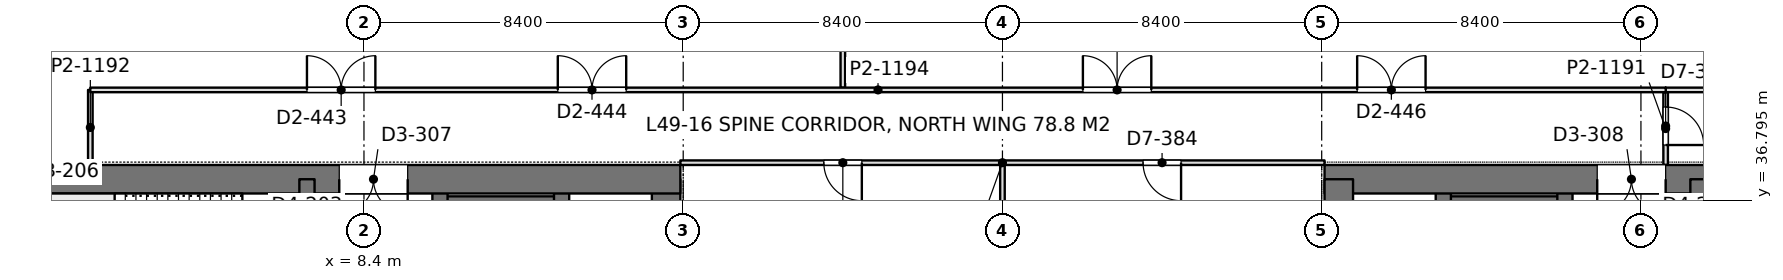
"""IFC4 building model, lengths in metres.
Left out: names, types, materials, properties, quantities, classifications, styles, units other than length and angle.
Written with IfcOpenShell. Run it as: python <this file> out.ifc"""

import sys

from ifc_helpers import new_model, si_unit, direction, frame, frame_2d, origin, place, context, subcontext, project, spatial, rectangle, extrude, element, fill, save


model = new_model("IFC4")
c1 = context("Model", 3, precision=1e-05, world=origin(), true_north=direction((0.0, 1.0)))
c2 = subcontext(c1, "Body", "Model", "MODEL_VIEW")
j1 = project(units=[si_unit("LENGTHUNIT", "METRE"), si_unit("PLANEANGLEUNIT", "RADIAN")], contexts=[c1])
p1 = place(None, origin())
s1 = spatial("IfcSite", under=j1, at=p1, CompositionType="ELEMENT")
p2 = place(p1, origin())
s2 = spatial("IfcBuilding", under=s1, at=p2, CompositionType="ELEMENT")
p3 = place(p2, frame((0.0, 0.0, 215.4)))
s3 = spatial("IfcBuildingStorey", under=s2, at=p3, CompositionType="ELEMENT", Elevation=215.4)
p4 = place(p3, frame((-1.125, 37.35, 0.0), z_axis=(0.0, 0.0, 1.0), x_axis=(1.0, 0.0, 0.0)))
e1 = element("IfcWall", 1, at=p4, inside=s3, PredefinedType="SHEAR", context=c2, shape_type="SweptSolid", body=[
    extrude(rectangle(XDim=17.85, YDim=0.75, at=frame_2d((8.925, 0.0))), origin(), (0.0, 0.0, 1.0), 4.2),
])
p5 = place(p4, frame((8.875, 0.0, 0.0)))
e2 = element("IfcOpeningElement", 2, at=p5, cuts=e1, PredefinedType="OPENING", context=c2, shape_type="SweptSolid", body=[
    extrude(rectangle(XDim=1.8, YDim=2.4, at=frame_2d((0.9, 1.2))), frame((0.0, 0.385, 0.0), z_axis=(0.0, -1.0, 0.0), x_axis=(1.0, 0.0, 0.0)), (0.0, 0.0, 1.0), 0.77),
])
p6 = place(p3, frame((16.35, 27.8, 0.0), z_axis=(0.0, 0.0, 1.0), x_axis=(0.0, 1.0, 0.0)))
e3 = element("IfcWall", 3, at=p6, inside=s3, PredefinedType="SHEAR", context=c2, shape_type="SweptSolid", body=[
    extrude(rectangle(XDim=9.55, YDim=0.75, at=frame_2d((4.775, 0.0))), origin(), (0.0, 0.0, 1.0), 4.2),
])
p7 = place(p3, frame((6.9, 13.05, 0.0), z_axis=(0.0, 0.0, 1.0), x_axis=(0.0, 1.0, 0.0)))
e4 = element("IfcWall", 4, at=p7, inside=s3, PredefinedType="SHEAR", context=c2, shape_type="SweptSolid", body=[
    extrude(rectangle(XDim=24.3, YDim=0.4, at=frame_2d((12.15, 0.0))), origin(), (0.0, 0.0, 1.0), 4.2),
])
p8 = place(p7, frame((1.3, 0.0, 0.0)))
e5 = element("IfcOpeningElement", 5, at=p8, cuts=e4, PredefinedType="OPENING", context=c2, shape_type="SweptSolid", body=[
    extrude(rectangle(XDim=1.0, YDim=2.2, at=frame_2d((0.5, 1.1))), frame((0.0, 0.21, 0.0), z_axis=(0.0, -1.0, 0.0), x_axis=(1.0, 0.0, 0.0)), (0.0, 0.0, 1.0), 0.42),
])
p9 = place(p7, frame((22.0, 0.0, 0.0)))
e6 = element("IfcOpeningElement", 6, at=p9, cuts=e4, PredefinedType="OPENING", context=c2, shape_type="SweptSolid", body=[
    extrude(rectangle(XDim=1.0, YDim=2.2, at=frame_2d((0.5, 1.1))), frame((0.0, 0.21, 0.0), z_axis=(0.0, -1.0, 0.0), x_axis=(1.0, 0.0, 0.0)), (0.0, 0.0, 1.0), 0.42),
])
p10 = place(p7, frame((5.55, 0.0, 0.0)))
e7 = element("IfcOpeningElement", 7, at=p10, cuts=e4, PredefinedType="OPENING", context=c2, shape_type="SweptSolid", body=[
    extrude(rectangle(XDim=1.0, YDim=2.2, at=frame_2d((0.5, 1.1))), frame((0.0, 0.21, 0.0), z_axis=(0.0, -1.0, 0.0), x_axis=(1.0, 0.0, 0.0)), (0.0, 0.0, 1.0), 0.42),
])
p11 = place(p7, frame((9.55, 0.0, 0.0)))
e8 = element("IfcOpeningElement", 8, at=p11, cuts=e4, PredefinedType="OPENING", context=c2, shape_type="SweptSolid", body=[
    extrude(rectangle(XDim=1.0, YDim=2.2, at=frame_2d((0.5, 1.1))), frame((0.0, 0.21, 0.0), z_axis=(0.0, -1.0, 0.0), x_axis=(1.0, 0.0, 0.0)), (0.0, 0.0, 1.0), 0.42),
])
p12 = place(p7, frame((12.8, 0.0, 0.0)))
e9 = element("IfcOpeningElement", 9, at=p12, cuts=e4, PredefinedType="OPENING", context=c2, shape_type="SweptSolid", body=[
    extrude(rectangle(XDim=1.1, YDim=2.2, at=frame_2d((0.55, 1.1))), frame((0.0, 0.21, 0.0), z_axis=(0.0, -1.0, 0.0), x_axis=(1.0, 0.0, 0.0)), (0.0, 0.0, 1.0), 0.42),
])
p13 = place(p7, frame((15.538, 0.0, 0.0)))
e10 = element("IfcOpeningElement", 10, at=p13, cuts=e4, PredefinedType="OPENING", context=c2, shape_type="SweptSolid", body=[
    extrude(rectangle(XDim=1.1, YDim=2.2, at=frame_2d((0.55, 1.1))), frame((0.0, 0.21, 0.0), z_axis=(0.0, -1.0, 0.0), x_axis=(1.0, 0.0, 0.0)), (0.0, 0.0, 1.0), 0.42),
])
p14 = place(p7, frame((18.262, 0.0, 0.0)))
e11 = element("IfcOpeningElement", 11, at=p14, cuts=e4, PredefinedType="OPENING", context=c2, shape_type="SweptSolid", body=[
    extrude(rectangle(XDim=1.1, YDim=2.2, at=frame_2d((0.55, 1.1))), frame((0.0, 0.21, 0.0), z_axis=(0.0, -1.0, 0.0), x_axis=(1.0, 0.0, 0.0)), (0.0, 0.0, 1.0), 0.42),
])
p15 = place(p3, frame((10.4, 13.05, 0.0), z_axis=(0.0, 0.0, 1.0), x_axis=(0.0, 1.0, 0.0)))
e12 = element("IfcWall", 12, at=p15, inside=s3, PredefinedType="SHEAR", context=c2, shape_type="SweptSolid", body=[
    extrude(rectangle(XDim=24.3, YDim=0.4, at=frame_2d((12.15, 0.0))), origin(), (0.0, 0.0, 1.0), 4.2),
])
p16 = place(p15, frame((15.75, 0.0, 0.0)))
e13 = element("IfcOpeningElement", 13, at=p16, cuts=e12, PredefinedType="OPENING", context=c2, shape_type="SweptSolid", body=[
    extrude(rectangle(XDim=1.1, YDim=2.2, at=frame_2d((0.55, 1.1))), frame((0.0, 0.21, 0.0), z_axis=(0.0, -1.0, 0.0), x_axis=(1.0, 0.0, 0.0)), (0.0, 0.0, 1.0), 0.42),
])
p17 = place(p15, frame((18.6, 0.0, 0.0)))
e14 = element("IfcOpeningElement", 14, at=p17, cuts=e12, PredefinedType="OPENING", context=c2, shape_type="SweptSolid", body=[
    extrude(rectangle(XDim=1.1, YDim=2.2, at=frame_2d((0.55, 1.1))), frame((0.0, 0.21, 0.0), z_axis=(0.0, -1.0, 0.0), x_axis=(1.0, 0.0, 0.0)), (0.0, 0.0, 1.0), 0.42),
])
p18 = place(p15, frame((21.45, 0.0, 0.0)))
e15 = element("IfcOpeningElement", 15, at=p18, cuts=e12, PredefinedType="OPENING", context=c2, shape_type="SweptSolid", body=[
    extrude(rectangle(XDim=1.1, YDim=2.2, at=frame_2d((0.55, 1.1))), frame((0.0, 0.21, 0.0), z_axis=(0.0, -1.0, 0.0), x_axis=(1.0, 0.0, 0.0)), (0.0, 0.0, 1.0), 0.42),
])
p19 = place(p15, frame((8.65, 0.0, 0.0)))
e16 = element("IfcOpeningElement", 16, at=p19, cuts=e12, PredefinedType="OPENING", context=c2, shape_type="SweptSolid", body=[
    extrude(rectangle(XDim=1.8, YDim=2.4, at=frame_2d((0.9, 1.2))), frame((0.0, 0.21, 0.0), z_axis=(0.0, -1.0, 0.0), x_axis=(1.0, 0.0, 0.0)), (0.0, 0.0, 1.0), 0.42),
])
p20 = place(p3, frame((13.6, 27.925, 0.0), z_axis=(0.0, 0.0, 1.0), x_axis=(0.0, 1.0, 0.0)))
e17 = element("IfcWall", 17, at=p20, inside=s3, PredefinedType="SHEAR", context=c2, shape_type="SweptSolid", body=[
    extrude(rectangle(XDim=9.425, YDim=0.4, at=frame_2d((4.712, 0.0))), origin(), (0.0, 0.0, 1.0), 4.2),
])
p21 = place(p3, frame((10.4, 36.625, 0.0), z_axis=(0.0, 0.0, 1.0), x_axis=(1.0, 0.0, 0.0)))
e18 = element("IfcWall", 18, at=p21, inside=s3, PredefinedType="SHEAR", context=c2, shape_type="SweptSolid", body=[
    extrude(rectangle(XDim=3.2, YDim=0.55, at=frame_2d((1.6, 0.0))), origin(), (0.0, 0.0, 1.0), 4.2),
])
p22 = place(p3, frame((33.675, 37.35, 0.0), z_axis=(0.0, 0.0, 1.0), x_axis=(1.0, 0.0, 0.0)))
e19 = element("IfcWall", 19, at=p22, inside=s3, PredefinedType="SHEAR", context=c2, shape_type="SweptSolid", body=[
    extrude(rectangle(XDim=17.85, YDim=0.75, at=frame_2d((8.925, 0.0))), origin(), (0.0, 0.0, 1.0), 4.2),
])
p23 = place(p22, frame((7.175, 0.0, 0.0)))
e20 = element("IfcOpeningElement", 20, at=p23, cuts=e19, PredefinedType="OPENING", context=c2, shape_type="SweptSolid", body=[
    extrude(rectangle(XDim=1.8, YDim=2.4, at=frame_2d((0.9, 1.2))), frame((0.0, 0.385, 0.0), z_axis=(0.0, -1.0, 0.0), x_axis=(1.0, 0.0, 0.0)), (0.0, 0.0, 1.0), 0.77),
])
p24 = place(p3, frame((34.05, 27.8, 0.0), z_axis=(0.0, 0.0, 1.0), x_axis=(0.0, 1.0, 0.0)))
e21 = element("IfcWall", 21, at=p24, inside=s3, PredefinedType="SHEAR", context=c2, shape_type="SweptSolid", body=[
    extrude(rectangle(XDim=9.55, YDim=0.75, at=frame_2d((4.775, 0.0))), origin(), (0.0, 0.0, 1.0), 4.2),
])
p25 = place(p3, frame((43.5, 13.05, 0.0), z_axis=(0.0, 0.0, 1.0), x_axis=(0.0, 1.0, 0.0)))
e22 = element("IfcWall", 22, at=p25, inside=s3, PredefinedType="SHEAR", context=c2, shape_type="SweptSolid", body=[
    extrude(rectangle(XDim=24.3, YDim=0.4, at=frame_2d((12.15, 0.0))), origin(), (0.0, 0.0, 1.0), 4.2),
])
p26 = place(p25, frame((1.3, 0.0, 0.0)))
e23 = element("IfcOpeningElement", 23, at=p26, cuts=e22, PredefinedType="OPENING", context=c2, shape_type="SweptSolid", body=[
    extrude(rectangle(XDim=1.0, YDim=2.2, at=frame_2d((0.5, 1.1))), frame((0.0, 0.21, 0.0), z_axis=(0.0, -1.0, 0.0), x_axis=(1.0, 0.0, 0.0)), (0.0, 0.0, 1.0), 0.42),
])
p27 = place(p25, frame((22.0, 0.0, 0.0)))
e24 = element("IfcOpeningElement", 24, at=p27, cuts=e22, PredefinedType="OPENING", context=c2, shape_type="SweptSolid", body=[
    extrude(rectangle(XDim=1.0, YDim=2.2, at=frame_2d((0.5, 1.1))), frame((0.0, 0.21, 0.0), z_axis=(0.0, -1.0, 0.0), x_axis=(1.0, 0.0, 0.0)), (0.0, 0.0, 1.0), 0.42),
])
p28 = place(p25, frame((5.55, 0.0, 0.0)))
e25 = element("IfcOpeningElement", 25, at=p28, cuts=e22, PredefinedType="OPENING", context=c2, shape_type="SweptSolid", body=[
    extrude(rectangle(XDim=1.0, YDim=2.2, at=frame_2d((0.5, 1.1))), frame((0.0, 0.21, 0.0), z_axis=(0.0, -1.0, 0.0), x_axis=(1.0, 0.0, 0.0)), (0.0, 0.0, 1.0), 0.42),
])
p29 = place(p25, frame((9.55, 0.0, 0.0)))
e26 = element("IfcOpeningElement", 26, at=p29, cuts=e22, PredefinedType="OPENING", context=c2, shape_type="SweptSolid", body=[
    extrude(rectangle(XDim=1.0, YDim=2.2, at=frame_2d((0.5, 1.1))), frame((0.0, 0.21, 0.0), z_axis=(0.0, -1.0, 0.0), x_axis=(1.0, 0.0, 0.0)), (0.0, 0.0, 1.0), 0.42),
])
p30 = place(p25, frame((12.8, 0.0, 0.0)))
e27 = element("IfcOpeningElement", 27, at=p30, cuts=e22, PredefinedType="OPENING", context=c2, shape_type="SweptSolid", body=[
    extrude(rectangle(XDim=1.1, YDim=2.2, at=frame_2d((0.55, 1.1))), frame((0.0, 0.21, 0.0), z_axis=(0.0, -1.0, 0.0), x_axis=(1.0, 0.0, 0.0)), (0.0, 0.0, 1.0), 0.42),
])
p31 = place(p25, frame((15.538, 0.0, 0.0)))
e28 = element("IfcOpeningElement", 28, at=p31, cuts=e22, PredefinedType="OPENING", context=c2, shape_type="SweptSolid", body=[
    extrude(rectangle(XDim=1.1, YDim=2.2, at=frame_2d((0.55, 1.1))), frame((0.0, 0.21, 0.0), z_axis=(0.0, -1.0, 0.0), x_axis=(1.0, 0.0, 0.0)), (0.0, 0.0, 1.0), 0.42),
])
p32 = place(p25, frame((18.262, 0.0, 0.0)))
e29 = element("IfcOpeningElement", 29, at=p32, cuts=e22, PredefinedType="OPENING", context=c2, shape_type="SweptSolid", body=[
    extrude(rectangle(XDim=1.1, YDim=2.2, at=frame_2d((0.55, 1.1))), frame((0.0, 0.21, 0.0), z_axis=(0.0, -1.0, 0.0), x_axis=(1.0, 0.0, 0.0)), (0.0, 0.0, 1.0), 0.42),
])
p33 = place(p3, frame((40.0, 13.05, 0.0), z_axis=(0.0, 0.0, 1.0), x_axis=(0.0, 1.0, 0.0)))
e30 = element("IfcWall", 30, at=p33, inside=s3, PredefinedType="SHEAR", context=c2, shape_type="SweptSolid", body=[
    extrude(rectangle(XDim=24.3, YDim=0.4, at=frame_2d((12.15, 0.0))), origin(), (0.0, 0.0, 1.0), 4.2),
])
p34 = place(p33, frame((15.75, 0.0, 0.0)))
e31 = element("IfcOpeningElement", 31, at=p34, cuts=e30, PredefinedType="OPENING", context=c2, shape_type="SweptSolid", body=[
    extrude(rectangle(XDim=1.1, YDim=2.2, at=frame_2d((0.55, 1.1))), frame((0.0, 0.21, 0.0), z_axis=(0.0, -1.0, 0.0), x_axis=(1.0, 0.0, 0.0)), (0.0, 0.0, 1.0), 0.42),
])
p35 = place(p33, frame((18.6, 0.0, 0.0)))
e32 = element("IfcOpeningElement", 32, at=p35, cuts=e30, PredefinedType="OPENING", context=c2, shape_type="SweptSolid", body=[
    extrude(rectangle(XDim=1.1, YDim=2.2, at=frame_2d((0.55, 1.1))), frame((0.0, 0.21, 0.0), z_axis=(0.0, -1.0, 0.0), x_axis=(1.0, 0.0, 0.0)), (0.0, 0.0, 1.0), 0.42),
])
p36 = place(p33, frame((21.45, 0.0, 0.0)))
e33 = element("IfcOpeningElement", 33, at=p36, cuts=e30, PredefinedType="OPENING", context=c2, shape_type="SweptSolid", body=[
    extrude(rectangle(XDim=1.1, YDim=2.2, at=frame_2d((0.55, 1.1))), frame((0.0, 0.21, 0.0), z_axis=(0.0, -1.0, 0.0), x_axis=(1.0, 0.0, 0.0)), (0.0, 0.0, 1.0), 0.42),
])
p37 = place(p33, frame((8.65, 0.0, 0.0)))
e34 = element("IfcOpeningElement", 34, at=p37, cuts=e30, PredefinedType="OPENING", context=c2, shape_type="SweptSolid", body=[
    extrude(rectangle(XDim=1.8, YDim=2.4, at=frame_2d((0.9, 1.2))), frame((0.0, 0.21, 0.0), z_axis=(0.0, -1.0, 0.0), x_axis=(1.0, 0.0, 0.0)), (0.0, 0.0, 1.0), 0.42),
])
p38 = place(p3, frame((36.8, 27.925, 0.0), z_axis=(0.0, 0.0, 1.0), x_axis=(0.0, 1.0, 0.0)))
e35 = element("IfcWall", 35, at=p38, inside=s3, PredefinedType="SHEAR", context=c2, shape_type="SweptSolid", body=[
    extrude(rectangle(XDim=9.425, YDim=0.4, at=frame_2d((4.712, 0.0))), origin(), (0.0, 0.0, 1.0), 4.2),
])
p39 = place(p3, frame((40.0, 36.625, 0.0), z_axis=(0.0, 0.0, 1.0), x_axis=(-1.0, 0.0, 0.0)))
e36 = element("IfcWall", 36, at=p39, inside=s3, PredefinedType="SHEAR", context=c2, shape_type="SweptSolid", body=[
    extrude(rectangle(XDim=3.2, YDim=0.55, at=frame_2d((1.6, 0.0))), origin(), (0.0, 0.0, 1.0), 4.2),
])
p40 = place(p3, frame((21.0, 39.758, 0.0), z_axis=(0.0, 0.0, 1.0), x_axis=(0.0, 1.0, 0.0)))
e37 = element("IfcWall", 37, at=p40, inside=s3, PredefinedType="PARTITIONING", context=c2, shape_type="SweptSolid", body=[
    extrude(rectangle(XDim=5.944, YDim=0.12, at=frame_2d((2.972, 0.0))), origin(), (0.0, 0.0, 1.0), 3.55),
])
p41 = place(p3, frame((1.2, 39.7, 0.0), z_axis=(0.0, 0.0, 1.0), x_axis=(1.0, 0.0, 0.0)))
e38 = element("IfcWall", 38, at=p41, inside=s3, PredefinedType="PARTITIONING", context=c2, shape_type="SweptSolid", body=[
    extrude(rectangle(XDim=41.452, YDim=0.12, at=frame_2d((20.726, 0.0))), origin(), (0.0, 0.0, 1.0), 3.55),
])
p42 = place(p41, frame((5.7, 0.0, 0.0)))
e39 = element("IfcOpeningElement", 39, at=p42, cuts=e38, PredefinedType="OPENING", context=c2, shape_type="SweptSolid", body=[
    extrude(rectangle(XDim=1.8, YDim=2.2, at=frame_2d((0.9, 1.1))), frame((0.0, 0.07, 0.0), z_axis=(0.0, -1.0, 0.0), x_axis=(1.0, 0.0, 0.0)), (0.0, 0.0, 1.0), 0.14),
])
p43 = place(p41, frame((12.3, 0.0, 0.0)))
e40 = element("IfcOpeningElement", 40, at=p43, cuts=e38, PredefinedType="OPENING", context=c2, shape_type="SweptSolid", body=[
    extrude(rectangle(XDim=1.8, YDim=2.2, at=frame_2d((0.9, 1.1))), frame((0.0, 0.07, 0.0), z_axis=(0.0, -1.0, 0.0), x_axis=(1.0, 0.0, 0.0)), (0.0, 0.0, 1.0), 0.14),
])
p44 = place(p41, frame((26.117, 0.0, 0.0)))
e41 = element("IfcOpeningElement", 41, at=p44, cuts=e38, PredefinedType="OPENING", context=c2, shape_type="SweptSolid", body=[
    extrude(rectangle(XDim=1.8, YDim=2.2, at=frame_2d((0.9, 1.1))), frame((0.0, 0.07, 0.0), z_axis=(0.0, -1.0, 0.0), x_axis=(1.0, 0.0, 0.0)), (0.0, 0.0, 1.0), 0.14),
])
p45 = place(p41, frame((33.333, 0.0, 0.0)))
e42 = element("IfcOpeningElement", 42, at=p45, cuts=e38, PredefinedType="OPENING", context=c2, shape_type="SweptSolid", body=[
    extrude(rectangle(XDim=1.8, YDim=2.2, at=frame_2d((0.9, 1.1))), frame((0.0, 0.07, 0.0), z_axis=(0.0, -1.0, 0.0), x_axis=(1.0, 0.0, 0.0)), (0.0, 0.0, 1.0), 0.14),
])
p46 = place(p3, frame((1.2, 37.724, 0.0), z_axis=(0.0, 0.0, 1.0), x_axis=(0.0, 1.0, 0.0)))
e43 = element("IfcWall", 43, at=p46, inside=s3, PredefinedType="PARTITIONING", context=c2, shape_type="SweptSolid", body=[
    extrude(rectangle(XDim=1.976, YDim=0.12, at=frame_2d((0.988, 0.0))), origin(), (0.0, 0.0, 1.0), 4.05),
])
p47 = place(p3, frame((42.65, 37.724, 0.0), z_axis=(0.0, 0.0, 1.0), x_axis=(0.0, 1.0, 0.0)))
e44 = element("IfcWall", 44, at=p47, inside=s3, PredefinedType="PARTITIONING", context=c2, shape_type="SweptSolid", body=[
    extrude(rectangle(XDim=1.918, YDim=0.12, at=frame_2d((0.959, 0.0))), origin(), (0.0, 0.0, 1.0), 4.05),
])
p48 = place(p47, frame((0.526, 0.0, 0.0)))
e45 = element("IfcOpeningElement", 45, at=p48, cuts=e44, PredefinedType="OPENING", context=c2, shape_type="SweptSolid", body=[
    extrude(rectangle(XDim=1.0, YDim=2.4, at=frame_2d((0.5, 1.2))), frame((0.0, 0.07, 0.0), z_axis=(0.0, -1.0, 0.0), x_axis=(1.0, 0.0, 0.0)), (0.0, 0.0, 1.0), 0.14),
])
p49 = place(p3, frame((42.648, 39.7, 0.0), z_axis=(0.0, 0.0, 1.0), x_axis=(1.0, 0.0, 0.0)))
e46 = element("IfcWall", 46, at=p49, inside=s3, PredefinedType="PARTITIONING", context=c2, shape_type="SweptSolid", body=[
    extrude(rectangle(XDim=6.552, YDim=0.12, at=frame_2d((3.276, 0.0))), origin(), (0.0, 0.0, 1.0), 3.69),
])
p50 = place(p3, frame((25.2, 34.149, 0.0), z_axis=(0.0, 0.0, 1.0), x_axis=(0.0, 1.0, 0.0)))
e47 = element("IfcWall", 47, at=p50, inside=s3, PredefinedType="PARTITIONING", context=c2, shape_type="SweptSolid", body=[
    extrude(rectangle(XDim=3.593, YDim=0.12, at=frame_2d((1.796, 0.0))), origin(), (0.0, 0.0, 1.0), 3.55),
])
p51 = place(p3, frame((16.725, 37.785, 0.0), z_axis=(0.0, 0.0, 1.0), x_axis=(1.0, 0.0, 0.0)))
e48 = element("IfcWall", 48, at=p51, inside=s3, PredefinedType="PARTITIONING", context=c2, shape_type="SweptSolid", body=[
    extrude(rectangle(XDim=16.95, YDim=0.12, at=frame_2d((8.475, 0.0))), origin(), (0.0, 0.0, 1.0), 3.55),
])
p52 = place(p51, frame((3.775, 0.0, 0.0)))
e49 = element("IfcOpeningElement", 49, at=p52, cuts=e48, PredefinedType="OPENING", context=c2, shape_type="SweptSolid", body=[
    extrude(rectangle(XDim=1.0, YDim=2.4, at=frame_2d((0.5, 1.2))), frame((0.0, 0.07, 0.0), z_axis=(0.0, -1.0, 0.0), x_axis=(1.0, 0.0, 0.0)), (0.0, 0.0, 1.0), 0.14),
])
p53 = place(p51, frame((12.175, 0.0, 0.0)))
e50 = element("IfcOpeningElement", 50, at=p53, cuts=e48, PredefinedType="OPENING", context=c2, shape_type="SweptSolid", body=[
    extrude(rectangle(XDim=1.0, YDim=2.4, at=frame_2d((0.5, 1.2))), frame((0.0, 0.07, 0.0), z_axis=(0.0, -1.0, 0.0), x_axis=(1.0, 0.0, 0.0)), (0.0, 0.0, 1.0), 0.14),
])
p54 = place(p5, frame((1.8, 0.0, 0.0), z_axis=(0.0, 0.0, 1.0), x_axis=(-1.0, 0.0, 0.0)))
e51 = element("IfcDoor", 51, at=p54, inside=s3, OperationType="DOUBLE_DOOR_SINGLE_SWING", PredefinedType="DOOR", context=c2, shape_type="SweptSolid", body=[
    extrude(rectangle(XDim=1.8, YDim=2.4, at=frame_2d((0.9, 1.2))), frame((0.0, 0.025, 0.0), z_axis=(0.0, -1.0, 0.0), x_axis=(1.0, 0.0, 0.0)), (0.0, 0.0, 1.0), 0.05),
])
fill(e2, e51)
p55 = place(p23, frame((1.8, 0.0, 0.0), z_axis=(0.0, 0.0, 1.0), x_axis=(-1.0, 0.0, 0.0)))
e52 = element("IfcDoor", 52, at=p55, inside=s3, OperationType="DOUBLE_DOOR_SINGLE_SWING", PredefinedType="DOOR", context=c2, shape_type="SweptSolid", body=[
    extrude(rectangle(XDim=1.8, YDim=2.4, at=frame_2d((0.9, 1.2))), frame((0.0, 0.025, 0.0), z_axis=(0.0, -1.0, 0.0), x_axis=(1.0, 0.0, 0.0)), (0.0, 0.0, 1.0), 0.05),
])
fill(e20, e52)
p56 = place(p42, origin())
e53 = element("IfcDoor", 53, at=p56, inside=s3, OperationType="DOUBLE_DOOR_SINGLE_SWING", PredefinedType="DOOR", context=c2, shape_type="SweptSolid", body=[
    extrude(rectangle(XDim=1.8, YDim=2.2, at=frame_2d((0.9, 1.1))), frame((0.0, 0.025, 0.0), z_axis=(0.0, -1.0, 0.0), x_axis=(1.0, 0.0, 0.0)), (0.0, 0.0, 1.0), 0.05),
])
fill(e39, e53)
p57 = place(p43, origin())
e54 = element("IfcDoor", 54, at=p57, inside=s3, OperationType="DOUBLE_DOOR_SINGLE_SWING", PredefinedType="DOOR", context=c2, shape_type="SweptSolid", body=[
    extrude(rectangle(XDim=1.8, YDim=2.2, at=frame_2d((0.9, 1.1))), frame((0.0, 0.025, 0.0), z_axis=(0.0, -1.0, 0.0), x_axis=(1.0, 0.0, 0.0)), (0.0, 0.0, 1.0), 0.05),
])
fill(e40, e54)
p58 = place(p44, origin())
e55 = element("IfcDoor", 55, at=p58, inside=s3, OperationType="DOUBLE_DOOR_SINGLE_SWING", PredefinedType="DOOR", context=c2, shape_type="SweptSolid", body=[
    extrude(rectangle(XDim=1.8, YDim=2.2, at=frame_2d((0.9, 1.1))), frame((0.0, 0.025, 0.0), z_axis=(0.0, -1.0, 0.0), x_axis=(1.0, 0.0, 0.0)), (0.0, 0.0, 1.0), 0.05),
])
fill(e41, e55)
p59 = place(p45, origin())
e56 = element("IfcDoor", 56, at=p59, inside=s3, OperationType="DOUBLE_DOOR_SINGLE_SWING", PredefinedType="DOOR", context=c2, shape_type="SweptSolid", body=[
    extrude(rectangle(XDim=1.8, YDim=2.2, at=frame_2d((0.9, 1.1))), frame((0.0, 0.025, 0.0), z_axis=(0.0, -1.0, 0.0), x_axis=(1.0, 0.0, 0.0)), (0.0, 0.0, 1.0), 0.05),
])
fill(e42, e56)
p60 = place(p48, frame((1.0, 0.0, 0.0), z_axis=(0.0, 0.0, 1.0), x_axis=(-1.0, 0.0, 0.0)))
e57 = element("IfcDoor", 57, at=p60, inside=s3, OperationType="SINGLE_SWING_RIGHT", PredefinedType="DOOR", context=c2, shape_type="SweptSolid", body=[
    extrude(rectangle(XDim=1.0, YDim=2.4, at=frame_2d((0.5, 1.2))), frame((0.0, 0.025, 0.0), z_axis=(0.0, -1.0, 0.0), x_axis=(1.0, 0.0, 0.0)), (0.0, 0.0, 1.0), 0.05),
])
fill(e45, e57)
p61 = place(p52, frame((1.0, 0.0, 0.0), z_axis=(0.0, 0.0, 1.0), x_axis=(-1.0, 0.0, 0.0)))
e58 = element("IfcDoor", 58, at=p61, inside=s3, OperationType="SINGLE_SWING_LEFT", PredefinedType="DOOR", context=c2, shape_type="SweptSolid", body=[
    extrude(rectangle(XDim=1.0, YDim=2.4, at=frame_2d((0.5, 1.2))), frame((0.0, 0.025, 0.0), z_axis=(0.0, -1.0, 0.0), x_axis=(1.0, 0.0, 0.0)), (0.0, 0.0, 1.0), 0.05),
])
fill(e49, e58)
p62 = place(p53, frame((1.0, 0.0, 0.0), z_axis=(0.0, 0.0, 1.0), x_axis=(-1.0, 0.0, 0.0)))
e59 = element("IfcDoor", 59, at=p62, inside=s3, OperationType="SINGLE_SWING_LEFT", PredefinedType="DOOR", context=c2, shape_type="SweptSolid", body=[
    extrude(rectangle(XDim=1.0, YDim=2.4, at=frame_2d((0.5, 1.2))), frame((0.0, 0.025, 0.0), z_axis=(0.0, -1.0, 0.0), x_axis=(1.0, 0.0, 0.0)), (0.0, 0.0, 1.0), 0.05),
])
fill(e50, e59)
save(model, sys.argv[1])
